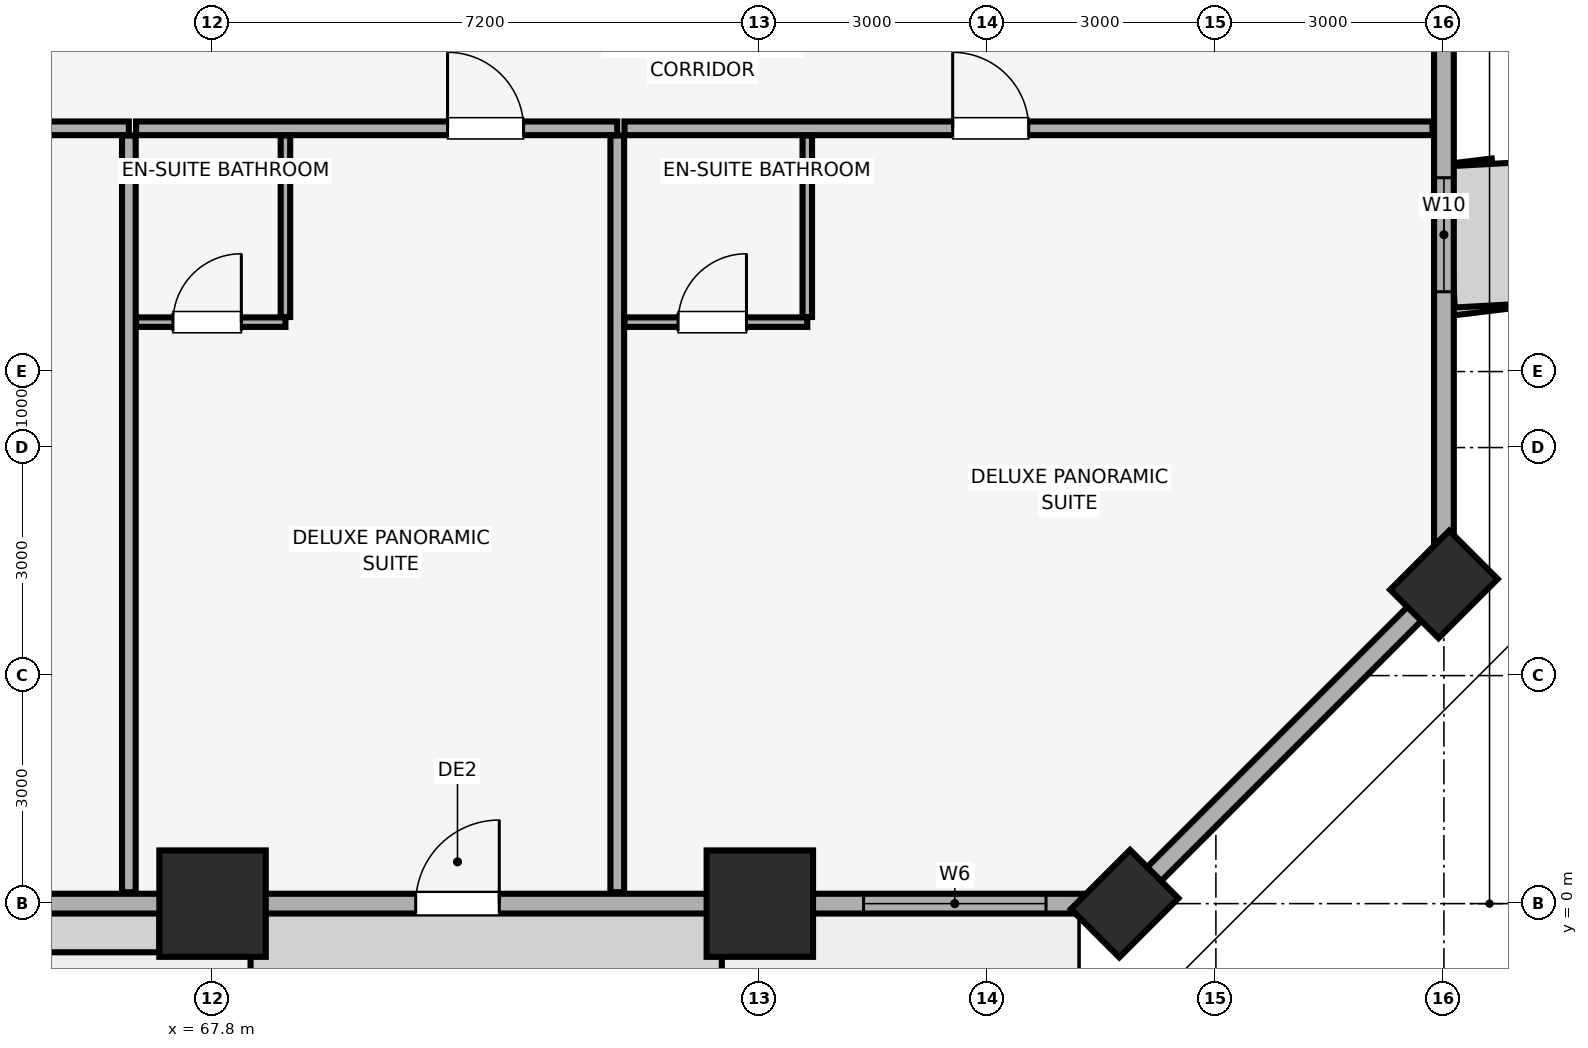
"""IFC4 building model, lengths in metres.
Left out: names, types, materials, properties, quantities, classifications, styles, units other than length and angle.
Written with IfcOpenShell. Run it as: python <this file> out.ifc"""

import sys

from ifc_helpers import new_model, si_unit, direction, frame, frame_2d, origin, origin_2d, place, context, subcontext, project, spatial, rectangle, extrude, element, fill, save


model = new_model("IFC4")
c1 = context("Model", 3, precision=1e-05, world=origin(), true_north=direction((0.0, 1.0)))
c2 = subcontext(c1, "Body", "Model", "MODEL_VIEW")
j1 = project(units=[si_unit("LENGTHUNIT", "METRE"), si_unit("PLANEANGLEUNIT", "RADIAN")], contexts=[c1])
p1 = place(None, origin())
s1 = spatial("IfcSite", under=j1, at=p1, CompositionType="ELEMENT")
p2 = place(p1, origin())
s2 = spatial("IfcBuilding", under=s1, at=p2, CompositionType="ELEMENT")
p3 = place(p2, frame((0.0, 0.0, 46.4)))
s3 = spatial("IfcBuildingStorey", under=s2, at=p3, CompositionType="ELEMENT", Elevation=46.4)
for number, where, z_axis, x_axis in (
    (1, (67.8, 0.0, 0.0), (0.0, 0.0, 1.0), (1.0, 0.0, 0.0)),
    (2, (75.0, 0.0, 0.0), (0.0, 0.0, 1.0), (1.0, 0.0, 0.0)),
):
    element("IfcColumn", number, at=place(p3, frame(where, z_axis=z_axis, x_axis=x_axis)), inside=s3, PredefinedType="COLUMN", context=c2, shape_type="SweptSolid", body=[
        extrude(rectangle(XDim=1.4, YDim=1.4, at=origin_2d()), origin(), (0.0, 0.0, 1.0), 3.51),
    ])
for number, where, z_axis, x_axis in (
    (3, (79.8, 0.0, 0.0), (0.0, 0.0, 1.0), (0.707, 0.707, 0.0)),
    (4, (84.0, 4.2, 0.0), (0.0, 0.0, 1.0), (0.707, 0.707, 0.0)),
):
    element("IfcColumn", number, at=place(p3, frame(where, z_axis=z_axis, x_axis=x_axis)), inside=s3, PredefinedType="PILASTER", context=c2, shape_type="SweptSolid", body=[
        extrude(rectangle(XDim=1.1, YDim=0.9, at=origin_2d()), origin(), (0.0, 0.0, 1.0), 3.51),
    ])
p4 = place(p3, frame((4.2, 0.0, 0.0), z_axis=(0.0, 0.0, 1.0), x_axis=(1.0, 0.0, 0.0)))
e5 = element("IfcWall", 5, at=p4, inside=s3, PredefinedType="SOLIDWALL", context=c2, shape_type="SweptSolid", body=[
    extrude(rectangle(XDim=75.6, YDim=0.26, at=frame_2d((37.8, 0.0))), origin(), (0.0, 0.0, 1.0), 2.56),
])
p5 = place(p4, frame((22.948, 0.0, 0.0)))
e6 = element("IfcOpeningElement", 6, at=p5, cuts=e5, PredefinedType="OPENING", context=c2, shape_type="SweptSolid", body=[
    extrude(rectangle(XDim=1.1, YDim=2.15, at=frame_2d((0.55, 1.075))), frame((0.0, 0.14, 0.0), z_axis=(0.0, -1.0, 0.0), x_axis=(1.0, 0.0, 0.0)), (0.0, 0.0, 1.0), 0.28),
])
p6 = place(p4, frame((44.61, 0.0, 0.0)))
e7 = element("IfcOpeningElement", 7, at=p6, cuts=e5, PredefinedType="OPENING", context=c2, shape_type="SweptSolid", body=[
    extrude(rectangle(XDim=1.1, YDim=2.15, at=frame_2d((0.55, 1.075))), frame((0.0, 0.14, 0.0), z_axis=(0.0, -1.0, 0.0), x_axis=(1.0, 0.0, 0.0)), (0.0, 0.0, 1.0), 0.28),
])
p7 = place(p4, frame((66.272, 0.0, 0.0)))
e8 = element("IfcOpeningElement", 8, at=p7, cuts=e5, PredefinedType="OPENING", context=c2, shape_type="SweptSolid", body=[
    extrude(rectangle(XDim=1.1, YDim=2.15, at=frame_2d((0.55, 1.075))), frame((0.0, 0.14, 0.0), z_axis=(0.0, -1.0, 0.0), x_axis=(1.0, 0.0, 0.0)), (0.0, 0.0, 1.0), 0.28),
])
p8 = place(p4, frame((1.035, 0.0, 0.85)))
e9 = element("IfcOpeningElement", 9, at=p8, cuts=e5, PredefinedType="OPENING", context=c2, shape_type="SweptSolid", body=[
    extrude(rectangle(XDim=2.4, YDim=1.5, at=frame_2d((1.2, 0.75))), frame((0.0, 0.14, 0.0), z_axis=(0.0, -1.0, 0.0), x_axis=(1.0, 0.0, 0.0)), (0.0, 0.0, 1.0), 0.28),
])
p9 = place(p4, frame((7.837, 0.0, 0.85)))
e10 = element("IfcOpeningElement", 10, at=p9, cuts=e5, PredefinedType="OPENING", context=c2, shape_type="SweptSolid", body=[
    extrude(rectangle(XDim=2.4, YDim=1.5, at=frame_2d((1.2, 0.75))), frame((0.0, 0.14, 0.0), z_axis=(0.0, -1.0, 0.0), x_axis=(1.0, 0.0, 0.0)), (0.0, 0.0, 1.0), 0.28),
])
p10 = place(p4, frame((14.55, 0.0, 0.85)))
e11 = element("IfcOpeningElement", 11, at=p10, cuts=e5, PredefinedType="OPENING", context=c2, shape_type="SweptSolid", body=[
    extrude(rectangle(XDim=2.4, YDim=1.5, at=frame_2d((1.2, 0.75))), frame((0.0, 0.14, 0.0), z_axis=(0.0, -1.0, 0.0), x_axis=(1.0, 0.0, 0.0)), (0.0, 0.0, 1.0), 0.28),
])
p11 = place(p4, frame((20.439, 0.0, 0.85)))
e12 = element("IfcOpeningElement", 12, at=p11, cuts=e5, PredefinedType="OPENING", context=c2, shape_type="SweptSolid", body=[
    extrude(rectangle(XDim=1.5, YDim=1.4, at=frame_2d((0.75, 0.7))), frame((0.0, 0.14, 0.0), z_axis=(0.0, -1.0, 0.0), x_axis=(1.0, 0.0, 0.0)), (0.0, 0.0, 1.0), 0.28),
])
p12 = place(p4, frame((27.887, 0.0, 0.85)))
e13 = element("IfcOpeningElement", 13, at=p12, cuts=e5, PredefinedType="OPENING", context=c2, shape_type="SweptSolid", body=[
    extrude(rectangle(XDim=2.4, YDim=1.5, at=frame_2d((1.2, 0.75))), frame((0.0, 0.14, 0.0), z_axis=(0.0, -1.0, 0.0), x_axis=(1.0, 0.0, 0.0)), (0.0, 0.0, 1.0), 0.28),
])
p13 = place(p4, frame((34.6, 0.0, 0.85)))
e14 = element("IfcOpeningElement", 14, at=p13, cuts=e5, PredefinedType="OPENING", context=c2, shape_type="SweptSolid", body=[
    extrude(rectangle(XDim=2.4, YDim=1.5, at=frame_2d((1.2, 0.75))), frame((0.0, 0.14, 0.0), z_axis=(0.0, -1.0, 0.0), x_axis=(1.0, 0.0, 0.0)), (0.0, 0.0, 1.0), 0.28),
])
p14 = place(p4, frame((38.399, 0.0, 0.85)))
e15 = element("IfcOpeningElement", 15, at=p14, cuts=e5, PredefinedType="OPENING", context=c2, shape_type="SweptSolid", body=[
    extrude(rectangle(XDim=2.4, YDim=1.5, at=frame_2d((1.2, 0.75))), frame((0.0, 0.14, 0.0), z_axis=(0.0, -1.0, 0.0), x_axis=(1.0, 0.0, 0.0)), (0.0, 0.0, 1.0), 0.28),
])
p15 = place(p4, frame((46.59, 0.0, 0.85)))
e16 = element("IfcOpeningElement", 16, at=p15, cuts=e5, PredefinedType="OPENING", context=c2, shape_type="SweptSolid", body=[
    extrude(rectangle(XDim=1.5, YDim=1.4, at=frame_2d((0.75, 0.7))), frame((0.0, 0.14, 0.0), z_axis=(0.0, -1.0, 0.0), x_axis=(1.0, 0.0, 0.0)), (0.0, 0.0, 1.0), 0.28),
])
p16 = place(p4, frame((51.824, 0.0, 0.85)))
e17 = element("IfcOpeningElement", 17, at=p16, cuts=e5, PredefinedType="OPENING", context=c2, shape_type="SweptSolid", body=[
    extrude(rectangle(XDim=2.4, YDim=1.5, at=frame_2d((1.2, 0.75))), frame((0.0, 0.14, 0.0), z_axis=(0.0, -1.0, 0.0), x_axis=(1.0, 0.0, 0.0)), (0.0, 0.0, 1.0), 0.28),
])
p17 = place(p4, frame((58.449, 0.0, 0.85)))
e18 = element("IfcOpeningElement", 18, at=p17, cuts=e5, PredefinedType="OPENING", context=c2, shape_type="SweptSolid", body=[
    extrude(rectangle(XDim=2.4, YDim=1.5, at=frame_2d((1.2, 0.75))), frame((0.0, 0.14, 0.0), z_axis=(0.0, -1.0, 0.0), x_axis=(1.0, 0.0, 0.0)), (0.0, 0.0, 1.0), 0.28),
])
p18 = place(p4, frame((72.165, 0.0, 0.85)))
e19 = element("IfcOpeningElement", 19, at=p18, cuts=e5, PredefinedType="OPENING", context=c2, shape_type="SweptSolid", body=[
    extrude(rectangle(XDim=2.4, YDim=1.5, at=frame_2d((1.2, 0.75))), frame((0.0, 0.14, 0.0), z_axis=(0.0, -1.0, 0.0), x_axis=(1.0, 0.0, 0.0)), (0.0, 0.0, 1.0), 0.28),
])
p19 = place(p3, frame((79.8, 0.0, 0.0), z_axis=(0.0, 0.0, 1.0), x_axis=(0.707106781187, 0.707106781187, 0.0)))
e20 = element("IfcWall", 20, at=p19, inside=s3, PredefinedType="SOLIDWALL", context=c2, shape_type="SweptSolid", body=[
    extrude(rectangle(XDim=5.94, YDim=0.26, at=frame_2d((2.97, 0.0))), origin(), (0.0, 0.0, 1.0), 2.56),
])
p20 = place(p3, frame((84.0, 4.2, 0.0), z_axis=(0.0, 0.0, 1.0), x_axis=(0.0, 1.0, 0.0)))
e21 = element("IfcWall", 21, at=p20, inside=s3, PredefinedType="SOLIDWALL", context=c2, shape_type="SweptSolid", body=[
    extrude(rectangle(XDim=40.6, YDim=0.26, at=frame_2d((20.3, 0.0))), origin(), (0.0, 0.0, 1.0), 2.56),
])
p21 = place(p20, frame((3.85, 0.0, 0.85)))
e22 = element("IfcOpeningElement", 22, at=p21, cuts=e21, PredefinedType="OPENING", context=c2, shape_type="SweptSolid", body=[
    extrude(rectangle(XDim=1.5, YDim=1.4, at=frame_2d((0.75, 0.7))), frame((0.0, 0.14, 0.0), z_axis=(0.0, -1.0, 0.0), x_axis=(1.0, 0.0, 0.0)), (0.0, 0.0, 1.0), 0.28),
])
p22 = place(p20, frame((13.115, 0.0, 0.85)))
e23 = element("IfcOpeningElement", 23, at=p22, cuts=e21, PredefinedType="OPENING", context=c2, shape_type="SweptSolid", body=[
    extrude(rectangle(XDim=1.5, YDim=1.4, at=frame_2d((0.75, 0.7))), frame((0.0, 0.14, 0.0), z_axis=(0.0, -1.0, 0.0), x_axis=(1.0, 0.0, 0.0)), (0.0, 0.0, 1.0), 0.28),
])
p23 = place(p20, frame((19.915, 0.0, 0.85)))
e24 = element("IfcOpeningElement", 24, at=p23, cuts=e21, PredefinedType="OPENING", context=c2, shape_type="SweptSolid", body=[
    extrude(rectangle(XDim=1.5, YDim=1.4, at=frame_2d((0.75, 0.7))), frame((0.0, 0.14, 0.0), z_axis=(0.0, -1.0, 0.0), x_axis=(1.0, 0.0, 0.0)), (0.0, 0.0, 1.0), 0.28),
])
p24 = place(p20, frame((27.165, 0.0, 0.85)))
e25 = element("IfcOpeningElement", 25, at=p24, cuts=e21, PredefinedType="OPENING", context=c2, shape_type="SweptSolid", body=[
    extrude(rectangle(XDim=1.5, YDim=1.4, at=frame_2d((0.75, 0.7))), frame((0.0, 0.14, 0.0), z_axis=(0.0, -1.0, 0.0), x_axis=(1.0, 0.0, 0.0)), (0.0, 0.0, 1.0), 0.28),
])
p25 = place(p20, frame((31.935, 0.0, 0.85)))
e26 = element("IfcOpeningElement", 26, at=p25, cuts=e21, PredefinedType="OPENING", context=c2, shape_type="SweptSolid", body=[
    extrude(rectangle(XDim=1.5, YDim=1.4, at=frame_2d((0.75, 0.7))), frame((0.0, 0.14, 0.0), z_axis=(0.0, -1.0, 0.0), x_axis=(1.0, 0.0, 0.0)), (0.0, 0.0, 1.0), 0.28),
])
p26 = place(p20, frame((37.365, 0.0, 0.85)))
e27 = element("IfcOpeningElement", 27, at=p26, cuts=e21, PredefinedType="OPENING", context=c2, shape_type="SweptSolid", body=[
    extrude(rectangle(XDim=1.5, YDim=1.4, at=frame_2d((0.75, 0.7))), frame((0.0, 0.14, 0.0), z_axis=(0.0, -1.0, 0.0), x_axis=(1.0, 0.0, 0.0)), (0.0, 0.0, 1.0), 0.28),
])
p27 = place(p3, frame((60.569, 10.2, 0.0), z_axis=(0.0, 0.0, 1.0), x_axis=(1.0, 0.0, 0.0)))
e28 = element("IfcWall", 28, at=p27, inside=s3, PredefinedType="PARTITIONING", context=c2, shape_type="SweptSolid", body=[
    extrude(rectangle(XDim=6.13, YDim=0.18, at=frame_2d((3.065, 0.0))), origin(), (0.0, 0.0, 1.0), 3.51),
])
p28 = place(p27, frame((3.967, 0.0, 0.0)))
e29 = element("IfcOpeningElement", 29, at=p28, cuts=e28, PredefinedType="OPENING", context=c2, shape_type="SweptSolid", body=[
    extrude(rectangle(XDim=1.0, YDim=2.15, at=frame_2d((0.5, 1.075))), frame((0.0, 0.1, 0.0), z_axis=(0.0, -1.0, 0.0), x_axis=(1.0, 0.0, 0.0)), (0.0, 0.0, 1.0), 0.2),
])
p29 = place(p3, frame((66.699, 0.15, 0.0), z_axis=(0.0, 0.0, 1.0), x_axis=(0.0, 1.0, 0.0)))
e30 = element("IfcWall", 30, at=p29, inside=s3, PredefinedType="PARTITIONING", context=c2, shape_type="SweptSolid", body=[
    extrude(rectangle(XDim=9.955, YDim=0.18, at=frame_2d((4.978, 0.0))), origin(), (0.0, 0.0, 1.0), 3.51),
])
p30 = place(p3, frame((66.794, 10.2, 0.0), z_axis=(0.0, 0.0, 1.0), x_axis=(1.0, 0.0, 0.0)))
e31 = element("IfcWall", 31, at=p30, inside=s3, PredefinedType="PARTITIONING", context=c2, shape_type="SweptSolid", body=[
    extrude(rectangle(XDim=6.331, YDim=0.18, at=frame_2d((3.165, 0.0))), origin(), (0.0, 0.0, 1.0), 3.51),
])
p31 = place(p30, frame((4.098, 0.0, 0.0)))
e32 = element("IfcOpeningElement", 32, at=p31, cuts=e31, PredefinedType="OPENING", context=c2, shape_type="SweptSolid", body=[
    extrude(rectangle(XDim=1.0, YDim=2.15, at=frame_2d((0.5, 1.075))), frame((0.0, 0.1, 0.0), z_axis=(0.0, -1.0, 0.0), x_axis=(1.0, 0.0, 0.0)), (0.0, 0.0, 1.0), 0.2),
])
p32 = place(p3, frame((73.124, 0.15, 0.0), z_axis=(0.0, 0.0, 1.0), x_axis=(0.0, 1.0, 0.0)))
e33 = element("IfcWall", 33, at=p32, inside=s3, PredefinedType="PARTITIONING", context=c2, shape_type="SweptSolid", body=[
    extrude(rectangle(XDim=9.955, YDim=0.18, at=frame_2d((4.978, 0.0))), origin(), (0.0, 0.0, 1.0), 3.51),
])
p33 = place(p3, frame((66.794, 7.65, 0.0), z_axis=(0.0, 0.0, 1.0), x_axis=(1.0, 0.0, 0.0)))
e34 = element("IfcWall", 34, at=p33, inside=s3, PredefinedType="PARTITIONING", context=c2, shape_type="SweptSolid", body=[
    extrude(rectangle(XDim=1.965, YDim=0.125, at=frame_2d((0.982, 0.0))), origin(), (0.0, 0.0, 1.0), 3.51),
])
p34 = place(p33, frame((0.485, 0.0, 0.0)))
e35 = element("IfcOpeningElement", 35, at=p34, cuts=e34, PredefinedType="OPENING", context=c2, shape_type="SweptSolid", body=[
    extrude(rectangle(XDim=0.9, YDim=2.1, at=frame_2d((0.45, 1.05))), frame((0.0, 0.073, 0.0), z_axis=(0.0, -1.0, 0.0), x_axis=(1.0, 0.0, 0.0)), (0.0, 0.0, 1.0), 0.145),
])
p35 = place(p3, frame((68.759, 7.718, 0.0), z_axis=(0.0, 0.0, 1.0), x_axis=(0.0, 1.0, 0.0)))
e36 = element("IfcWall", 36, at=p35, inside=s3, PredefinedType="PARTITIONING", context=c2, shape_type="SweptSolid", body=[
    extrude(rectangle(XDim=2.387, YDim=0.125, at=frame_2d((1.194, 0.0))), origin(), (0.0, 0.0, 1.0), 3.51),
])
p36 = place(p3, frame((73.219, 10.2, 0.0), z_axis=(0.0, 0.0, 1.0), x_axis=(1.0, 0.0, 0.0)))
e37 = element("IfcWall", 37, at=p36, inside=s3, PredefinedType="PARTITIONING", context=c2, shape_type="SweptSolid", body=[
    extrude(rectangle(XDim=10.631, YDim=0.18, at=frame_2d((5.315, 0.0))), origin(), (0.0, 0.0, 1.0), 3.51),
])
p37 = place(p36, frame((4.318, 0.0, 0.0)))
e38 = element("IfcOpeningElement", 38, at=p37, cuts=e37, PredefinedType="OPENING", context=c2, shape_type="SweptSolid", body=[
    extrude(rectangle(XDim=1.0, YDim=2.15, at=frame_2d((0.5, 1.075))), frame((0.0, 0.1, 0.0), z_axis=(0.0, -1.0, 0.0), x_axis=(1.0, 0.0, 0.0)), (0.0, 0.0, 1.0), 0.2),
])
p38 = place(p3, frame((73.219, 7.65, 0.0), z_axis=(0.0, 0.0, 1.0), x_axis=(1.0, 0.0, 0.0)))
e39 = element("IfcWall", 39, at=p38, inside=s3, PredefinedType="PARTITIONING", context=c2, shape_type="SweptSolid", body=[
    extrude(rectangle(XDim=2.405, YDim=0.125, at=frame_2d((1.203, 0.0))), origin(), (0.0, 0.0, 1.0), 3.51),
])
p39 = place(p38, frame((0.705, 0.0, 0.0)))
e40 = element("IfcOpeningElement", 40, at=p39, cuts=e39, PredefinedType="OPENING", context=c2, shape_type="SweptSolid", body=[
    extrude(rectangle(XDim=0.9, YDim=2.1, at=frame_2d((0.45, 1.05))), frame((0.0, 0.073, 0.0), z_axis=(0.0, -1.0, 0.0), x_axis=(1.0, 0.0, 0.0)), (0.0, 0.0, 1.0), 0.145),
])
p40 = place(p3, frame((75.624, 7.718, 0.0), z_axis=(0.0, 0.0, 1.0), x_axis=(0.0, 1.0, 0.0)))
e41 = element("IfcWall", 41, at=p40, inside=s3, PredefinedType="PARTITIONING", context=c2, shape_type="SweptSolid", body=[
    extrude(rectangle(XDim=2.387, YDim=0.125, at=frame_2d((1.194, 0.0))), origin(), (0.0, 0.0, 1.0), 3.51),
])
p41 = place(p7, origin())
e42 = element("IfcDoor", 42, at=p41, inside=s3, OperationType="SINGLE_SWING_RIGHT", PredefinedType="DOOR", context=c2, shape_type="SweptSolid", body=[
    extrude(rectangle(XDim=1.1, YDim=2.15, at=frame_2d((0.55, 1.075))), frame((0.0, 0.025, 0.0), z_axis=(0.0, -1.0, 0.0), x_axis=(1.0, 0.0, 0.0)), (0.0, 0.0, 1.0), 0.05),
])
fill(e8, e42)
p42 = place(p18, origin())
e43 = element("IfcWindow", 43, at=p42, inside=s3, PartitioningType="SINGLE_PANEL", PredefinedType="WINDOW", context=c2, shape_type="SweptSolid", body=[
    extrude(rectangle(XDim=2.4, YDim=1.5, at=frame_2d((1.2, 0.75))), frame((0.0, 0.03, 0.0), z_axis=(0.0, -1.0, 0.0), x_axis=(1.0, 0.0, 0.0)), (0.0, 0.0, 1.0), 0.06),
])
fill(e19, e43)
p43 = place(p21, origin())
e44 = element("IfcWindow", 44, at=p43, inside=s3, PartitioningType="SINGLE_PANEL", PredefinedType="WINDOW", context=c2, shape_type="SweptSolid", body=[
    extrude(rectangle(XDim=1.5, YDim=1.4, at=frame_2d((0.75, 0.7))), frame((0.0, 0.03, 0.0), z_axis=(0.0, -1.0, 0.0), x_axis=(1.0, 0.0, 0.0)), (0.0, 0.0, 1.0), 0.06),
])
fill(e22, e44)
p44 = place(p31, origin())
e45 = element("IfcDoor", 45, at=p44, inside=s3, OperationType="SINGLE_SWING_LEFT", PredefinedType="DOOR", context=c2, shape_type="SweptSolid", body=[
    extrude(rectangle(XDim=1.0, YDim=2.15, at=frame_2d((0.5, 1.075))), frame((0.0, 0.025, 0.0), z_axis=(0.0, -1.0, 0.0), x_axis=(1.0, 0.0, 0.0)), (0.0, 0.0, 1.0), 0.05),
])
fill(e32, e45)
p45 = place(p34, origin())
e46 = element("IfcDoor", 46, at=p45, inside=s3, OperationType="SINGLE_SWING_RIGHT", PredefinedType="DOOR", context=c2, shape_type="SweptSolid", body=[
    extrude(rectangle(XDim=0.9, YDim=2.1, at=frame_2d((0.45, 1.05))), frame((0.0, 0.025, 0.0), z_axis=(0.0, -1.0, 0.0), x_axis=(1.0, 0.0, 0.0)), (0.0, 0.0, 1.0), 0.05),
])
fill(e35, e46)
p46 = place(p37, origin())
e47 = element("IfcDoor", 47, at=p46, inside=s3, OperationType="SINGLE_SWING_LEFT", PredefinedType="DOOR", context=c2, shape_type="SweptSolid", body=[
    extrude(rectangle(XDim=1.0, YDim=2.15, at=frame_2d((0.5, 1.075))), frame((0.0, 0.025, 0.0), z_axis=(0.0, -1.0, 0.0), x_axis=(1.0, 0.0, 0.0)), (0.0, 0.0, 1.0), 0.05),
])
fill(e38, e47)
p47 = place(p39, origin())
e48 = element("IfcDoor", 48, at=p47, inside=s3, OperationType="SINGLE_SWING_RIGHT", PredefinedType="DOOR", context=c2, shape_type="SweptSolid", body=[
    extrude(rectangle(XDim=0.9, YDim=2.1, at=frame_2d((0.45, 1.05))), frame((0.0, 0.025, 0.0), z_axis=(0.0, -1.0, 0.0), x_axis=(1.0, 0.0, 0.0)), (0.0, 0.0, 1.0), 0.05),
])
fill(e40, e48)
save(model, sys.argv[1])
